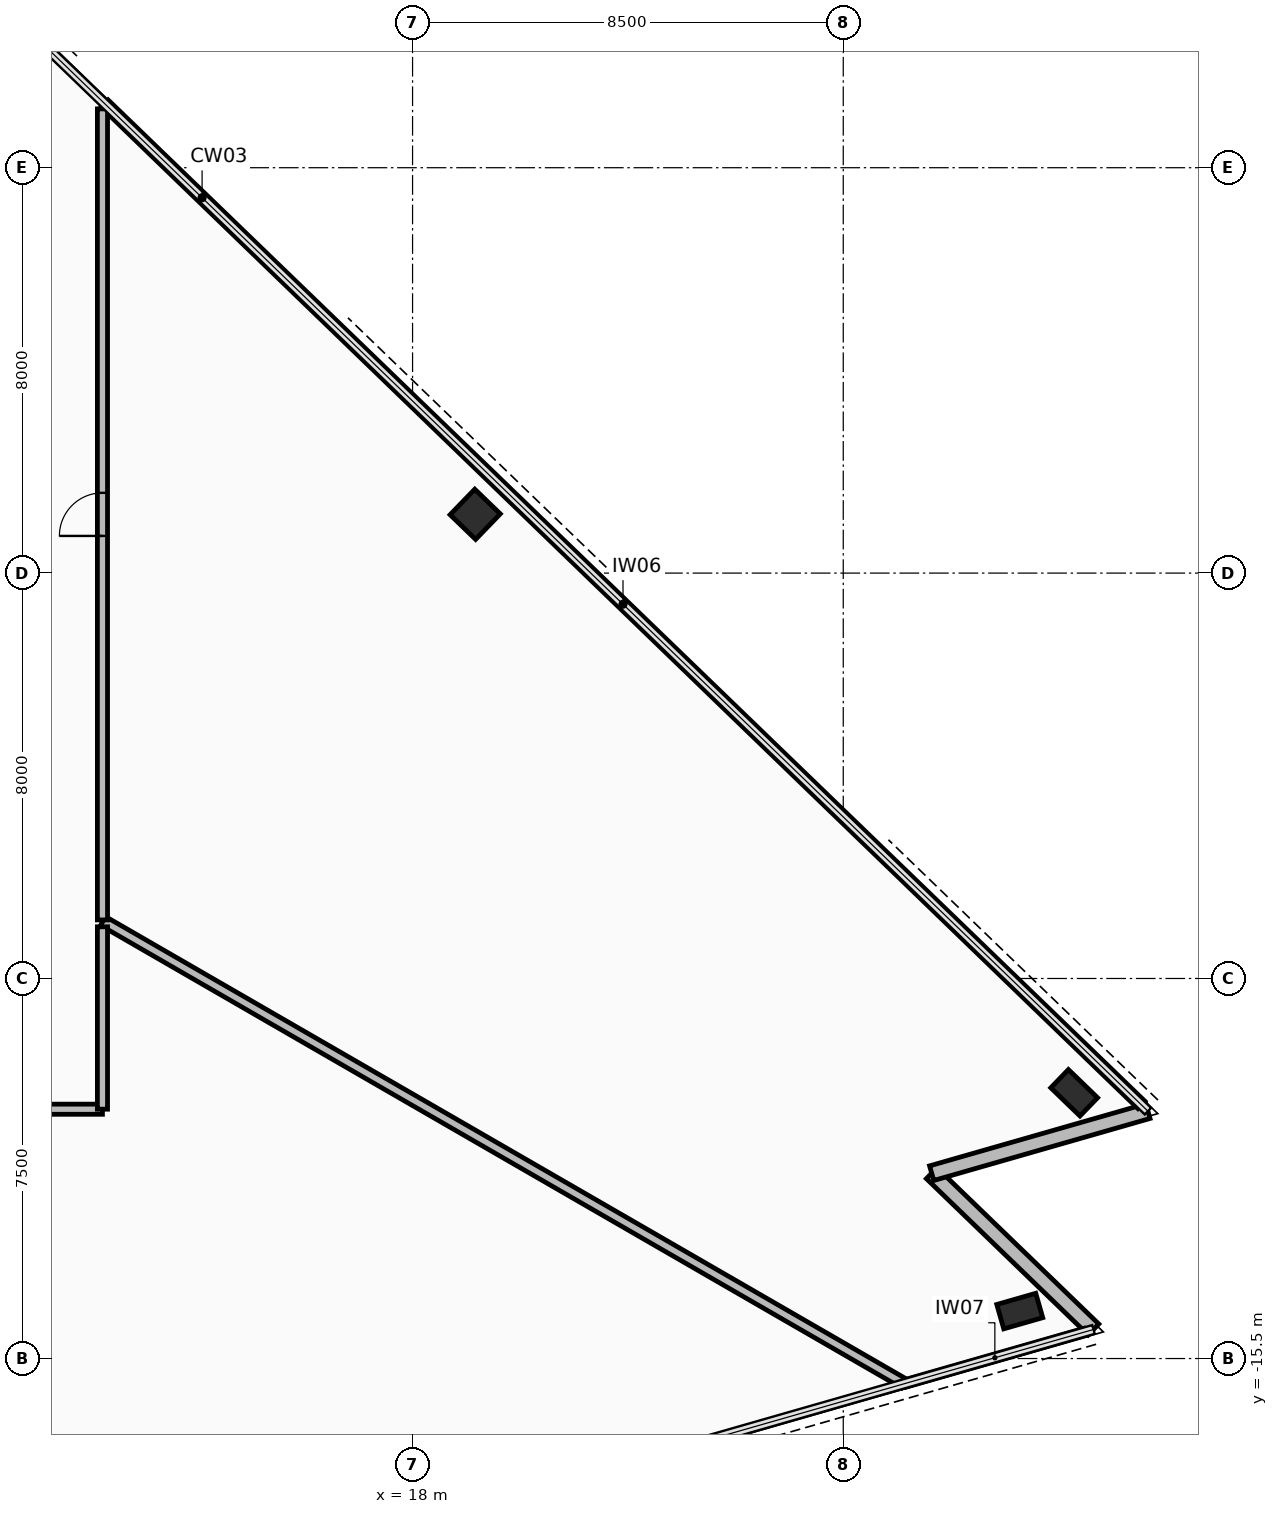
"""IFC4 building model, lengths in metres.
Left out: names, types, materials, properties, quantities, classifications, styles, units other than length and angle.
Written with IfcOpenShell. Run it as: python <this file> out.ifc"""

import sys

from ifc_helpers import new_model, si_unit, direction, frame, frame_2d, origin, origin_2d, place, context, subcontext, project, spatial, rectangle, hollow_rectangle, extrude, element, fill, save


model = new_model("IFC4")
c1 = context("Model", 3, precision=1e-05, world=origin(), true_north=direction((0.0, 1.0)))
c2 = subcontext(c1, "Body", "Model", "MODEL_VIEW")
j1 = project(units=[si_unit("LENGTHUNIT", "METRE"), si_unit("PLANEANGLEUNIT", "RADIAN")], contexts=[c1])
p1 = place(None, origin())
s1 = spatial("IfcSite", under=j1, at=p1, CompositionType="ELEMENT")
p2 = place(p1, origin())
s2 = spatial("IfcBuilding", under=s1, at=p2, CompositionType="ELEMENT")
p3 = place(p2, frame((0.0, 0.0, 104.1)))
s3 = spatial("IfcBuildingStorey", under=s2, at=p3, CompositionType="ELEMENT", Elevation=104.1)
for number, where, z_axis, x_axis in (
    (1, (29.983, -14.564, 0.0), (0.0, 0.0, 1.0), (0.961, 0.276, 0.0)),
    (2, (31.058, -10.256, 0.0), (0.0, 0.0, 1.0), (-0.719, 0.695, 0.0)),
):
    element("IfcColumn", number, at=place(p3, frame(where, z_axis=z_axis, x_axis=x_axis)), inside=s3, PredefinedType="COLUMN", context=c2, shape_type="SweptSolid", body=[
        extrude(hollow_rectangle(XDim=0.5, YDim=0.8, WallThickness=0.04, at=origin_2d()), origin(), (0.0, 0.0, 1.0), 3.6),
    ])
p4 = place(p3, frame((19.236, 1.16, 0.0), z_axis=(0.0, 0.0, 1.0), x_axis=(-0.719339800339, 0.694658370459, 0.0)))
e3 = element("IfcColumn", 3, at=p4, inside=s3, PredefinedType="COLUMN", context=c2, shape_type="SweptSolid", body=[
    extrude(hollow_rectangle(XDim=0.7, YDim=0.7, WallThickness=0.04, at=origin_2d()), origin(), (0.0, 0.0, 1.0), 3.6),
])
p5 = place(p3, frame((31.439, -14.927, 0.0), z_axis=(0.0, 0.0, 1.0), x_axis=(-0.719317126864, 0.694681848763, 0.0)))
e4 = element("IfcWall", 4, at=p5, inside=s3, PredefinedType="STANDARD", context=c2, shape_type="SweptSolid", body=[
    extrude(rectangle(XDim=4.44, YDim=0.3, at=frame_2d((2.22, 0.0))), origin(), (0.0, 0.0, 1.0), 2.605),
])
p6 = place(p3, frame((28.245, -11.842, 0.0), z_axis=(0.0, 0.0, 1.0), x_axis=(0.961255810825, 0.275657878821, 0.0)))
e5 = element("IfcWall", 5, at=p6, inside=s3, PredefinedType="STANDARD", context=c2, shape_type="SweptSolid", body=[
    extrude(rectangle(XDim=4.44, YDim=0.3, at=frame_2d((2.22, 0.0))), origin(), (0.0, 0.0, 1.0), 2.605),
])
p7 = place(p3, frame((11.922, 9.266, 0.0), z_axis=(0.0, 0.0, 1.0), x_axis=(0.719341119542, -0.694657004382, 0.0)))
e6 = element("IfcWall", 6, at=p7, inside=s3, PredefinedType="PARTITIONING", context=c2, shape_type="SweptSolid", body=[
    extrude(rectangle(XDim=28.445, YDim=0.2, at=frame_2d((14.223, 0.0))), origin(), (0.0, 0.0, 1.0), 3.41),
])
p8 = place(p3, frame((31.267, -14.976, 0.0), z_axis=(0.0, 0.0, 1.0), x_axis=(-0.96126154114, -0.275637895661, 0.0)))
e7 = element("IfcWall", 7, at=p8, inside=s3, PredefinedType="PARTITIONING", context=c2, shape_type="SweptSolid", body=[
    extrude(rectangle(XDim=3.693, YDim=0.15, at=frame_2d((1.846, 0.0))), origin(), (0.0, 0.0, 1.0), 3.41),
])
p9 = place(p3, frame((27.698, -15.991, 0.0), z_axis=(0.0, 0.0, 1.0), x_axis=(-0.866028310072, 0.499994966129, 0.0)))
e8 = element("IfcWall", 8, at=p9, inside=s3, PredefinedType="PARTITIONING", context=c2, shape_type="SweptSolid", body=[
    extrude(rectangle(XDim=18.25, YDim=0.2, at=frame_2d((9.125, 0.0))), origin(), (0.0, 0.0, 1.0), 2.605),
])
p10 = place(p3, frame((11.88, -6.844, 0.0), z_axis=(0.0, 0.0, 1.0), x_axis=(0.0, 1.0, 0.0)))
e9 = element("IfcWall", 9, at=p10, inside=s3, PredefinedType="PARTITIONING", context=c2, shape_type="SweptSolid", body=[
    extrude(rectangle(XDim=16.005, YDim=0.2, at=frame_2d((8.002, 0.0))), origin(), (0.0, 0.0, 1.0), 2.605),
])
p11 = place(p10, frame((7.578, 0.0, 0.0)))
e10 = element("IfcOpeningElement", 10, at=p11, cuts=e9, PredefinedType="OPENING", context=c2, shape_type="SweptSolid", body=[
    extrude(rectangle(XDim=0.85, YDim=2.1, at=frame_2d((0.425, 1.05))), frame((0.0, 0.11, 0.0), z_axis=(0.0, -1.0, 0.0), x_axis=(1.0, 0.0, 0.0)), (0.0, 0.0, 1.0), 0.22),
])
p12 = place(p3, frame((-2.229, -10.58, 0.0), z_axis=(0.0, 0.0, 1.0), x_axis=(1.0, 0.0, 0.0)))
e11 = element("IfcWall", 11, at=p12, inside=s3, PredefinedType="PARTITIONING", context=c2, shape_type="SweptSolid", body=[
    extrude(rectangle(XDim=14.108, YDim=0.2, at=frame_2d((7.054, 0.0))), origin(), (0.0, 0.0, 1.0), 2.805),
])
p13 = place(p12, frame((6.554, 0.0, 0.0)))
e12 = element("IfcOpeningElement", 12, at=p13, cuts=e11, PredefinedType="OPENING", context=c2, shape_type="SweptSolid", body=[
    extrude(rectangle(XDim=1.0, YDim=2.15, at=frame_2d((0.5, 1.075))), frame((0.0, 0.11, 0.0), z_axis=(0.0, -1.0, 0.0), x_axis=(1.0, 0.0, 0.0)), (0.0, 0.0, 1.0), 0.22),
])
p14 = place(p3, frame((11.88, -10.579, 0.0), z_axis=(0.0, 0.0, 1.0), x_axis=(0.0, 1.0, 0.0)))
e13 = element("IfcWall", 13, at=p14, inside=s3, PredefinedType="PARTITIONING", context=c2, shape_type="SweptSolid", body=[
    extrude(rectangle(XDim=3.599, YDim=0.2, at=frame_2d((1.8, 0.0))), origin(), (0.0, 0.0, 1.0), 2.805),
])
p15 = place(p11, origin())
e14 = element("IfcDoor", 14, at=p15, inside=s3, OperationType="SINGLE_SWING_RIGHT", PredefinedType="DOOR", context=c2, shape_type="SweptSolid", body=[
    extrude(rectangle(XDim=0.85, YDim=2.1, at=frame_2d((0.425, 1.05))), frame((0.0, 0.025, 0.0), z_axis=(0.0, -1.0, 0.0), x_axis=(1.0, 0.0, 0.0)), (0.0, 0.0, 1.0), 0.05),
])
fill(e10, e14)
save(model, sys.argv[1])
